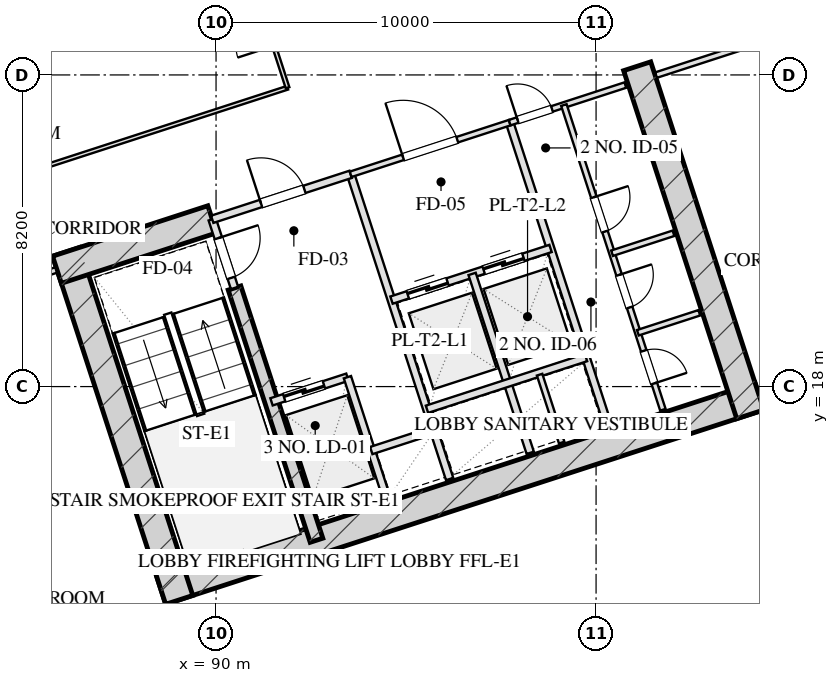
"""IFC4 building model, lengths in metres.
Left out: names, types, materials, properties, quantities, classifications, styles, units other than length and angle.
Written with IfcOpenShell. Run it as: python <this file> out.ifc"""

import sys

from ifc_helpers import new_model, si_unit, direction, frame, frame_2d, origin, place, context, subcontext, project, spatial, rectangle, extrude, element, fill, save


model = new_model("IFC4")
c1 = context("Model", 3, precision=1e-05, world=origin(), true_north=direction((0.0, 1.0)))
c2 = subcontext(c1, "Body", "Model", "MODEL_VIEW")
j1 = project(units=[si_unit("LENGTHUNIT", "METRE"), si_unit("PLANEANGLEUNIT", "RADIAN")], contexts=[c1])
p1 = place(None, origin())
s1 = spatial("IfcSite", under=j1, at=p1, CompositionType="ELEMENT")
p2 = place(p1, origin())
s2 = spatial("IfcBuilding", under=s1, at=p2, CompositionType="ELEMENT")
p3 = place(p2, frame((0.0, 0.0, 50.6)))
s3 = spatial("IfcBuildingStorey", under=s2, at=p3, CompositionType="ELEMENT", Elevation=50.6)
p4 = place(p3, frame((88.559, 12.629, 0.0), z_axis=(0.0, 0.0, 1.0), x_axis=(0.951056072937, 0.309018358888, 0.0)))
e1 = element("IfcWall", 1, at=p4, inside=s3, PredefinedType="SHEAR", context=c2, shape_type="SweptSolid", body=[
    extrude(rectangle(XDim=16.55, YDim=0.75, at=frame_2d((8.275, 0.0))), origin(), (0.0, 0.0, 1.0), 3.45),
])
p5 = place(p3, frame((86.055, 21.546, 0.0), z_axis=(0.0, 0.0, 1.0), x_axis=(0.309023585745, -0.951054374604, 0.0)))
e2 = element("IfcWall", 2, at=p5, inside=s3, PredefinedType="SHEAR", context=c2, shape_type="SweptSolid", body=[
    extrude(rectangle(XDim=9.63, YDim=0.75, at=frame_2d((4.815, 0.0))), origin(), (0.0, 0.0, 1.0), 3.45),
])
p6 = place(p3, frame((101.082, 26.429, 0.0), z_axis=(0.0, 0.0, 1.0), x_axis=(0.309016134813, -0.951056795583, 0.0)))
e3 = element("IfcWall", 3, at=p6, inside=s3, PredefinedType="SHEAR", context=c2, shape_type="SweptSolid", body=[
    extrude(rectangle(XDim=9.63, YDim=0.75, at=frame_2d((4.815, 0.0))), origin(), (0.0, 0.0, 1.0), 3.45),
])
p7 = place(p3, frame((90.486, 20.594, 0.0), z_axis=(0.0, 0.0, 1.0), x_axis=(0.309020428229, -0.951055400562, 0.0)))
e4 = element("IfcWall", 4, at=p7, inside=s3, PredefinedType="SHEAR", context=c2, shape_type="SweptSolid", body=[
    extrude(rectangle(XDim=6.98, YDim=0.35, at=frame_2d((3.49, 0.0))), origin(), (0.0, 0.0, 1.0), 3.45),
])
p8 = place(p3, frame((85.814, 21.074, 0.0), z_axis=(0.0, 0.0, 1.0), x_axis=(0.95106580992, 0.308988390074, 0.0)))
e5 = element("IfcWall", 5, at=p8, inside=s3, PredefinedType="SHEAR", context=c2, shape_type="SweptSolid", body=[
    extrude(rectangle(XDim=4.295, YDim=0.75, at=frame_2d((2.147, 0.0))), origin(), (0.0, 0.0, 1.0), 3.45),
])
p9 = place(p3, frame((100.345, 63.648, 0.0), z_axis=(0.0, 0.0, 1.0), x_axis=(0.309014526607, -0.951057318118, 0.0)))
e6 = element("IfcWall", 6, at=p9, inside=s3, PredefinedType="SOLIDWALL", context=c2, shape_type="SweptSolid", body=[
    extrude(rectangle(XDim=50.0, YDim=0.4, at=frame_2d((25.0, 0.0))), origin(), (0.0, 0.0, 1.0), 2.61),
])
p10 = place(p9, frame((30.15, 0.0, 0.75)))
e7 = element("IfcOpeningElement", 7, at=p10, cuts=e6, PredefinedType="OPENING", context=c2, shape_type="SweptSolid", body=[
    extrude(rectangle(XDim=2.5, YDim=1.46, at=frame_2d((1.25, 0.73))), frame((0.0, 0.21, 0.0), z_axis=(0.0, -1.0, 0.0), x_axis=(1.0, 0.0, 0.0)), (0.0, 0.0, 1.0), 0.42),
])
p11 = place(p9, frame((18.65, 0.0, 0.0)))
e8 = element("IfcOpeningElement", 8, at=p11, cuts=e6, PredefinedType="OPENING", context=c2, shape_type="SweptSolid", body=[
    extrude(rectangle(XDim=1.1, YDim=2.15, at=frame_2d((0.55, 1.075))), frame((0.0, 0.21, 0.0), z_axis=(0.0, -1.0, 0.0), x_axis=(1.0, 0.0, 0.0)), (0.0, 0.0, 1.0), 0.42),
])
p12 = place(p3, frame((113.998, 12.567, 0.0), z_axis=(0.0, 0.0, 1.0), x_axis=(-0.951055939317, -0.309018770125, 0.0)))
e9 = element("IfcWall", 9, at=p12, inside=s3, PredefinedType="SOLIDWALL", context=c2, shape_type="SweptSolid", body=[
    extrude(rectangle(XDim=32.4, YDim=0.4, at=frame_2d((16.2, 0.0))), origin(), (0.0, 0.0, 1.0), 2.61),
])
p13 = place(p3, frame((89.899, 22.401, 0.0), z_axis=(0.0, 0.0, 1.0), x_axis=(0.308932062672, -0.951084108086, 0.0)))
e10 = element("IfcWall", 10, at=p13, inside=s3, PredefinedType="PARTITIONING", context=c2, shape_type="SweptSolid", body=[
    extrude(rectangle(XDim=1.9, YDim=0.2, at=frame_2d((0.95, 0.0))), origin(), (0.0, 0.0, 1.0), 3.175),
])
p14 = place(p13, frame((0.52, 0.0, 0.0)))
e11 = element("IfcOpeningElement", 11, at=p14, cuts=e10, PredefinedType="OPENING", context=c2, shape_type="SweptSolid", body=[
    extrude(rectangle(XDim=1.1, YDim=2.05, at=frame_2d((0.55, 1.025))), frame((0.0, 0.11, 0.0), z_axis=(0.0, -1.0, 0.0), x_axis=(1.0, 0.0, 0.0)), (0.0, 0.0, 1.0), 0.22),
])
p15 = place(p3, frame((93.542, 23.585, 0.0), z_axis=(0.0, 0.0, 1.0), x_axis=(0.309042196757, -0.951048327176, 0.0)))
e12 = element("IfcWall", 12, at=p15, inside=s3, PredefinedType="PARTITIONING", context=c2, shape_type="SweptSolid", body=[
    extrude(rectangle(XDim=8.43, YDim=0.2, at=frame_2d((4.215, 0.0))), origin(), (0.0, 0.0, 1.0), 3.175),
])
p16 = place(p3, frame((89.899, 22.401, 0.0), z_axis=(0.0, 0.0, 1.0), x_axis=(0.951046716504, 0.309047153403, 0.0)))
e13 = element("IfcWall", 13, at=p16, inside=s3, PredefinedType="PARTITIONING", context=c2, shape_type="SweptSolid", body=[
    extrude(rectangle(XDim=3.83, YDim=0.2, at=frame_2d((1.915, 0.0))), origin(), (0.0, 0.0, 1.0), 3.175),
])
p17 = place(p16, frame((1.35, 0.0, 0.0)))
e14 = element("IfcOpeningElement", 14, at=p17, cuts=e13, PredefinedType="OPENING", context=c2, shape_type="SweptSolid", body=[
    extrude(rectangle(XDim=1.2, YDim=2.05, at=frame_2d((0.6, 1.025))), frame((0.0, 0.11, 0.0), z_axis=(0.0, -1.0, 0.0), x_axis=(1.0, 0.0, 0.0)), (0.0, 0.0, 1.0), 0.22),
])
p18 = place(p3, frame((91.46, 17.598, 0.0), z_axis=(0.0, 0.0, 1.0), x_axis=(0.951062257173, 0.308999325213, 0.0)))
e15 = element("IfcWall", 15, at=p18, inside=s3, PredefinedType="PARTITIONING", context=c2, shape_type="SweptSolid", body=[
    extrude(rectangle(XDim=2.1, YDim=0.2, at=frame_2d((1.05, 0.0))), origin(), (0.0, 0.0, 1.0), 3.175),
])
p19 = place(p18, frame((0.35, 0.0, 0.0)))
e16 = element("IfcOpeningElement", 16, at=p19, cuts=e15, PredefinedType="OPENING", context=c2, shape_type="SweptSolid", body=[
    extrude(rectangle(XDim=1.1, YDim=2.05, at=frame_2d((0.55, 1.025))), frame((0.0, 0.11, 0.0), z_axis=(0.0, -1.0, 0.0), x_axis=(1.0, 0.0, 0.0)), (0.0, 0.0, 1.0), 0.22),
])
p20 = place(p3, frame((93.457, 18.247, 0.0), z_axis=(0.0, 0.0, 1.0), x_axis=(0.3089935693, -0.951064127245, 0.0)))
e17 = element("IfcWall", 17, at=p20, inside=s3, PredefinedType="PARTITIONING", context=c2, shape_type="SweptSolid", body=[
    extrude(rectangle(XDim=3.7, YDim=0.2, at=frame_2d((1.85, 0.0))), origin(), (0.0, 0.0, 1.0), 3.175),
])
p21 = place(p3, frame((94.084, 16.317, 0.0), z_axis=(0.0, 0.0, 1.0), x_axis=(0.951041328149, 0.309063734775, 0.0)))
e18 = element("IfcWall", 18, at=p21, inside=s3, PredefinedType="PARTITIONING", context=c2, shape_type="SweptSolid", body=[
    extrude(rectangle(XDim=1.73, YDim=0.2, at=frame_2d((0.865, 0.0))), origin(), (0.0, 0.0, 1.0), 3.175),
])
p22 = place(p3, frame((97.727, 24.944, 0.0), z_axis=(0.0, 0.0, 1.0), x_axis=(0.309016001439, -0.951056838919, 0.0)))
e19 = element("IfcWall", 19, at=p22, inside=s3, PredefinedType="PARTITIONING", context=c2, shape_type="SweptSolid", body=[
    extrude(rectangle(XDim=8.43, YDim=0.2, at=frame_2d((4.215, 0.0))), origin(), (0.0, 0.0, 1.0), 3.175),
])
p23 = place(p3, frame((93.542, 23.585, 0.0), z_axis=(0.0, 0.0, 1.0), x_axis=(0.951063829732, 0.308994485023, 0.0)))
e20 = element("IfcWall", 20, at=p23, inside=s3, PredefinedType="PARTITIONING", context=c2, shape_type="SweptSolid", body=[
    extrude(rectangle(XDim=4.4, YDim=0.15, at=frame_2d((2.2, 0.0))), origin(), (0.0, 0.0, 1.0), 3.175),
])
p24 = place(p23, frame((1.45, 0.0, 0.0)))
e21 = element("IfcOpeningElement", 21, at=p24, cuts=e20, PredefinedType="OPENING", context=c2, shape_type="SweptSolid", body=[
    extrude(rectangle(XDim=1.5, YDim=2.05, at=frame_2d((0.75, 1.025))), frame((0.0, 0.085, 0.0), z_axis=(0.0, -1.0, 0.0), x_axis=(1.0, 0.0, 0.0)), (0.0, 0.0, 1.0), 0.17),
])
p25 = place(p3, frame((94.617, 20.275, 0.0), z_axis=(0.0, 0.0, 1.0), x_axis=(0.951058531764, 0.30901079133, 0.0)))
e22 = element("IfcWall", 22, at=p25, inside=s3, PredefinedType="PARTITIONING", context=c2, shape_type="SweptSolid", body=[
    extrude(rectangle(XDim=4.4, YDim=0.2, at=frame_2d((2.2, 0.0))), origin(), (0.0, 0.0, 1.0), 3.175),
])
p26 = place(p25, frame((0.45, 0.0, 0.0)))
e23 = element("IfcOpeningElement", 23, at=p26, cuts=e22, PredefinedType="OPENING", context=c2, shape_type="SweptSolid", body=[
    extrude(rectangle(XDim=1.1, YDim=2.05, at=frame_2d((0.55, 1.025))), frame((0.0, 0.11, 0.0), z_axis=(0.0, -1.0, 0.0), x_axis=(1.0, 0.0, 0.0)), (0.0, 0.0, 1.0), 0.22),
])
p27 = place(p25, frame((2.55, 0.0, 0.0)))
e24 = element("IfcOpeningElement", 24, at=p27, cuts=e22, PredefinedType="OPENING", context=c2, shape_type="SweptSolid", body=[
    extrude(rectangle(XDim=1.1, YDim=2.05, at=frame_2d((0.55, 1.025))), frame((0.0, 0.11, 0.0), z_axis=(0.0, -1.0, 0.0), x_axis=(1.0, 0.0, 0.0)), (0.0, 0.0, 1.0), 0.22),
])
p28 = place(p3, frame((96.738, 20.964, 0.0), z_axis=(0.0, 0.0, 1.0), x_axis=(0.309042578481, -0.951048203135, 0.0)))
e25 = element("IfcWall", 25, at=p28, inside=s3, PredefinedType="PARTITIONING", context=c2, shape_type="SweptSolid", body=[
    extrude(rectangle(XDim=4.95, YDim=0.2, at=frame_2d((2.475, 0.0))), origin(), (0.0, 0.0, 1.0), 3.175),
])
p29 = place(p3, frame((95.551, 17.403, 0.0), z_axis=(0.0, 0.0, 1.0), x_axis=(0.951058531764, 0.30901079133, 0.0)))
e26 = element("IfcWall", 26, at=p29, inside=s3, PredefinedType="PARTITIONING", context=c2, shape_type="SweptSolid", body=[
    extrude(rectangle(XDim=4.4, YDim=0.2, at=frame_2d((2.2, 0.0))), origin(), (0.0, 0.0, 1.0), 3.175),
])
p30 = place(p3, frame((98.514, 18.313, 0.0), z_axis=(0.0, 0.0, 1.0), x_axis=(0.309089008895, -0.951033114345, 0.0)))
e27 = element("IfcWall", 27, at=p30, inside=s3, PredefinedType="PARTITIONING", context=c2, shape_type="SweptSolid", body=[
    extrude(rectangle(XDim=1.88, YDim=0.15, at=frame_2d((0.94, 0.0))), origin(), (0.0, 0.0, 1.0), 3.175),
])
p31 = place(p3, frame((97.727, 24.944, 0.0), z_axis=(0.0, 0.0, 1.0), x_axis=(0.951036872128, 0.309077446369, 0.0)))
e28 = element("IfcWall", 28, at=p31, inside=s3, PredefinedType="PARTITIONING", context=c2, shape_type="SweptSolid", body=[
    extrude(rectangle(XDim=3.2, YDim=0.15, at=frame_2d((1.6, 0.0))), origin(), (0.0, 0.0, 1.0), 3.175),
])
p32 = place(p31, frame((0.22, 0.0, 0.0)))
e29 = element("IfcOpeningElement", 29, at=p32, cuts=e28, PredefinedType="OPENING", context=c2, shape_type="SweptSolid", body=[
    extrude(rectangle(XDim=0.95, YDim=2.05, at=frame_2d((0.475, 1.025))), frame((0.0, 0.085, 0.0), z_axis=(0.0, -1.0, 0.0), x_axis=(1.0, 0.0, 0.0)), (0.0, 0.0, 1.0), 0.17),
])
p33 = place(p3, frame((99.153, 25.408, 0.0), z_axis=(0.0, 0.0, 1.0), x_axis=(0.309016001439, -0.951056838919, 0.0)))
e30 = element("IfcWall", 30, at=p33, inside=s3, PredefinedType="PARTITIONING", context=c2, shape_type="SweptSolid", body=[
    extrude(rectangle(XDim=8.43, YDim=0.15, at=frame_2d((4.215, 0.0))), origin(), (0.0, 0.0, 1.0), 3.175),
])
p34 = place(p33, frame((2.55, 0.0, 0.0)))
e31 = element("IfcOpeningElement", 31, at=p34, cuts=e30, PredefinedType="OPENING", context=c2, shape_type="SweptSolid", body=[
    extrude(rectangle(XDim=0.95, YDim=2.05, at=frame_2d((0.475, 1.025))), frame((0.0, 0.085, 0.0), z_axis=(0.0, -1.0, 0.0), x_axis=(1.0, 0.0, 0.0)), (0.0, 0.0, 1.0), 0.17),
])
p35 = place(p33, frame((4.7, 0.0, 0.0)))
e32 = element("IfcOpeningElement", 32, at=p35, cuts=e30, PredefinedType="OPENING", context=c2, shape_type="SweptSolid", body=[
    extrude(rectangle(XDim=0.9, YDim=2.05, at=frame_2d((0.45, 1.025))), frame((0.0, 0.085, 0.0), z_axis=(0.0, -1.0, 0.0), x_axis=(1.0, 0.0, 0.0)), (0.0, 0.0, 1.0), 0.17),
])
p36 = place(p33, frame((6.8, 0.0, 0.0)))
e33 = element("IfcOpeningElement", 33, at=p36, cuts=e30, PredefinedType="OPENING", context=c2, shape_type="SweptSolid", body=[
    extrude(rectangle(XDim=0.9, YDim=2.05, at=frame_2d((0.45, 1.025))), frame((0.0, 0.085, 0.0), z_axis=(0.0, -1.0, 0.0), x_axis=(1.0, 0.0, 0.0)), (0.0, 0.0, 1.0), 0.17),
])
p37 = place(p3, frame((100.42, 21.509, 0.0), z_axis=(0.0, 0.0, 1.0), x_axis=(0.951040401051, 0.309066587596, 0.0)))
e34 = element("IfcWall", 34, at=p37, inside=s3, PredefinedType="PARTITIONING", context=c2, shape_type="SweptSolid", body=[
    extrude(rectangle(XDim=1.7, YDim=0.15, at=frame_2d((0.85, 0.0))), origin(), (0.0, 0.0, 1.0), 3.175),
])
p38 = place(p3, frame((101.1, 19.416, 0.0), z_axis=(0.0, 0.0, 1.0), x_axis=(0.951054116971, 0.309024378638, 0.0)))
e35 = element("IfcWall", 35, at=p38, inside=s3, PredefinedType="PARTITIONING", context=c2, shape_type="SweptSolid", body=[
    extrude(rectangle(XDim=1.7, YDim=0.15, at=frame_2d((0.85, 0.0))), origin(), (0.0, 0.0, 1.0), 3.175),
])
p39 = place(p3, frame((75.519, 17.729, 0.0), z_axis=(0.0, 0.0, 1.0), x_axis=(0.951056658866, 0.309016555588, 0.0)))
e36 = element("IfcWall", 36, at=p39, inside=s3, PredefinedType="PARTITIONING", context=c2, shape_type="SweptSolid", body=[
    extrude(rectangle(XDim=10.8, YDim=0.15, at=frame_2d((5.4, 0.0))), origin(), (0.0, 0.0, 1.0), 3.175),
])
p40 = place(p39, frame((4.536, 0.0, 0.0)))
e37 = element("IfcOpeningElement", 37, at=p40, cuts=e36, PredefinedType="OPENING", context=c2, shape_type="SweptSolid", body=[
    extrude(rectangle(XDim=1.0, YDim=2.05, at=frame_2d((0.5, 1.025))), frame((0.0, 0.085, 0.0), z_axis=(0.0, -1.0, 0.0), x_axis=(1.0, 0.0, 0.0)), (0.0, 0.0, 1.0), 0.17),
])
p41 = place(p3, frame((101.578, 26.196, 0.0), z_axis=(0.0, 0.0, 1.0), x_axis=(0.951059043131, 0.309009217467, 0.0)))
e38 = element("IfcWall", 38, at=p41, inside=s3, PredefinedType="PARTITIONING", context=c2, shape_type="SweptSolid", body=[
    extrude(rectangle(XDim=10.2, YDim=0.15, at=frame_2d((5.1, 0.0))), origin(), (0.0, 0.0, 1.0), 3.175),
])
p42 = place(p41, frame((4.284, 0.0, 0.0)))
e39 = element("IfcOpeningElement", 39, at=p42, cuts=e38, PredefinedType="OPENING", context=c2, shape_type="SweptSolid", body=[
    extrude(rectangle(XDim=1.0, YDim=2.05, at=frame_2d((0.5, 1.025))), frame((0.0, 0.085, 0.0), z_axis=(0.0, -1.0, 0.0), x_axis=(1.0, 0.0, 0.0)), (0.0, 0.0, 1.0), 0.17),
])
p43 = place(p3, frame((74.691, 20.278, 0.0), z_axis=(0.0, 0.0, 1.0), x_axis=(0.951053521786, 0.309026210375, 0.0)))
e40 = element("IfcWall", 40, at=p43, inside=s3, PredefinedType="MOVABLE", context=c2, shape_type="SweptSolid", body=[
    extrude(rectangle(XDim=18.075, YDim=0.1, at=frame_2d((9.038, 0.0))), origin(), (0.0, 0.0, 1.0), 3.175),
])
p44 = place(p3, frame((91.882, 25.863, 0.0), z_axis=(0.0, 0.0, 1.0), x_axis=(-0.309022042254, 0.951054876125, 0.0)))
e41 = element("IfcWall", 41, at=p44, inside=s3, PredefinedType="MOVABLE", context=c2, shape_type="SweptSolid", body=[
    extrude(rectangle(XDim=16.64, YDim=0.1, at=frame_2d((8.32, 0.0))), origin(), (0.0, 0.0, 1.0), 3.175),
])
p45 = place(p44, frame((1.16, 0.0, 0.0)))
e42 = element("IfcOpeningElement", 42, at=p45, cuts=e41, PredefinedType="OPENING", context=c2, shape_type="SweptSolid", body=[
    extrude(rectangle(XDim=1.0, YDim=2.05, at=frame_2d((0.5, 1.025))), frame((0.0, 0.06, 0.0), z_axis=(0.0, -1.0, 0.0), x_axis=(1.0, 0.0, 0.0)), (0.0, 0.0, 1.0), 0.12),
])
p46 = place(p44, frame((6.16, 0.0, 0.0)))
e43 = element("IfcOpeningElement", 43, at=p46, cuts=e41, PredefinedType="OPENING", context=c2, shape_type="SweptSolid", body=[
    extrude(rectangle(XDim=1.0, YDim=2.05, at=frame_2d((0.5, 1.025))), frame((0.0, 0.06, 0.0), z_axis=(0.0, -1.0, 0.0), x_axis=(1.0, 0.0, 0.0)), (0.0, 0.0, 1.0), 0.12),
])
p47 = place(p44, frame((10.16, 0.0, 0.0)))
e44 = element("IfcOpeningElement", 44, at=p47, cuts=e41, PredefinedType="OPENING", context=c2, shape_type="SweptSolid", body=[
    extrude(rectangle(XDim=1.0, YDim=2.05, at=frame_2d((0.5, 1.025))), frame((0.0, 0.06, 0.0), z_axis=(0.0, -1.0, 0.0), x_axis=(1.0, 0.0, 0.0)), (0.0, 0.0, 1.0), 0.12),
])
p48 = place(p44, frame((14.48, 0.0, 0.0)))
e45 = element("IfcOpeningElement", 45, at=p48, cuts=e41, PredefinedType="OPENING", context=c2, shape_type="SweptSolid", body=[
    extrude(rectangle(XDim=1.0, YDim=2.05, at=frame_2d((0.5, 1.025))), frame((0.0, 0.06, 0.0), z_axis=(0.0, -1.0, 0.0), x_axis=(1.0, 0.0, 0.0)), (0.0, 0.0, 1.0), 0.12),
])
p49 = place(p3, frame((73.356, 24.386, 0.0), z_axis=(0.0, 0.0, 1.0), x_axis=(0.951057491432, 0.309013993197, 0.0)))
e46 = element("IfcWall", 46, at=p49, inside=s3, PredefinedType="MOVABLE", context=c2, shape_type="SweptSolid", body=[
    extrude(rectangle(XDim=18.075, YDim=0.1, at=frame_2d((9.038, 0.0))), origin(), (0.0, 0.0, 1.0), 3.175),
])
p50 = place(p14, origin())
e47 = element("IfcDoor", 47, at=p50, inside=s3, OperationType="SINGLE_SWING_LEFT", PredefinedType="DOOR", context=c2, shape_type="SweptSolid", body=[
    extrude(rectangle(XDim=1.1, YDim=2.05, at=frame_2d((0.55, 1.025))), frame((0.0, 0.025, 0.0), z_axis=(0.0, -1.0, 0.0), x_axis=(1.0, 0.0, 0.0)), (0.0, 0.0, 1.0), 0.05),
])
fill(e11, e47)
p51 = place(p17, origin())
e48 = element("IfcDoor", 48, at=p51, inside=s3, OperationType="SINGLE_SWING_LEFT", PredefinedType="DOOR", context=c2, shape_type="SweptSolid", body=[
    extrude(rectangle(XDim=1.2, YDim=2.05, at=frame_2d((0.6, 1.025))), frame((0.0, 0.025, 0.0), z_axis=(0.0, -1.0, 0.0), x_axis=(1.0, 0.0, 0.0)), (0.0, 0.0, 1.0), 0.05),
])
fill(e14, e48)
p52 = place(p19, origin())
e49 = element("IfcDoor", 49, at=p52, inside=s3, OperationType="DOUBLE_DOOR_SLIDING", PredefinedType="DOOR", context=c2, shape_type="SweptSolid", body=[
    extrude(rectangle(XDim=1.1, YDim=2.05, at=frame_2d((0.55, 1.025))), frame((0.0, 0.025, 0.0), z_axis=(0.0, -1.0, 0.0), x_axis=(1.0, 0.0, 0.0)), (0.0, 0.0, 1.0), 0.05),
])
fill(e16, e49)
p53 = place(p24, origin())
e50 = element("IfcDoor", 50, at=p53, inside=s3, OperationType="SINGLE_SWING_LEFT", PredefinedType="DOOR", context=c2, shape_type="SweptSolid", body=[
    extrude(rectangle(XDim=1.5, YDim=2.05, at=frame_2d((0.75, 1.025))), frame((0.0, 0.025, 0.0), z_axis=(0.0, -1.0, 0.0), x_axis=(1.0, 0.0, 0.0)), (0.0, 0.0, 1.0), 0.05),
])
fill(e21, e50)
p54 = place(p26, origin())
e51 = element("IfcDoor", 51, at=p54, inside=s3, OperationType="DOUBLE_DOOR_SLIDING", PredefinedType="DOOR", context=c2, shape_type="SweptSolid", body=[
    extrude(rectangle(XDim=1.1, YDim=2.05, at=frame_2d((0.55, 1.025))), frame((0.0, 0.025, 0.0), z_axis=(0.0, -1.0, 0.0), x_axis=(1.0, 0.0, 0.0)), (0.0, 0.0, 1.0), 0.05),
])
fill(e23, e51)
p55 = place(p27, origin())
e52 = element("IfcDoor", 52, at=p55, inside=s3, OperationType="DOUBLE_DOOR_SLIDING", PredefinedType="DOOR", context=c2, shape_type="SweptSolid", body=[
    extrude(rectangle(XDim=1.1, YDim=2.05, at=frame_2d((0.55, 1.025))), frame((0.0, 0.025, 0.0), z_axis=(0.0, -1.0, 0.0), x_axis=(1.0, 0.0, 0.0)), (0.0, 0.0, 1.0), 0.05),
])
fill(e24, e52)
p56 = place(p32, origin())
e53 = element("IfcDoor", 53, at=p56, inside=s3, OperationType="SINGLE_SWING_LEFT", PredefinedType="DOOR", context=c2, shape_type="SweptSolid", body=[
    extrude(rectangle(XDim=0.95, YDim=2.05, at=frame_2d((0.475, 1.025))), frame((0.0, 0.025, 0.0), z_axis=(0.0, -1.0, 0.0), x_axis=(1.0, 0.0, 0.0)), (0.0, 0.0, 1.0), 0.05),
])
fill(e29, e53)
p57 = place(p34, origin())
e54 = element("IfcDoor", 54, at=p57, inside=s3, OperationType="SINGLE_SWING_LEFT", PredefinedType="DOOR", context=c2, shape_type="SweptSolid", body=[
    extrude(rectangle(XDim=0.95, YDim=2.05, at=frame_2d((0.475, 1.025))), frame((0.0, 0.025, 0.0), z_axis=(0.0, -1.0, 0.0), x_axis=(1.0, 0.0, 0.0)), (0.0, 0.0, 1.0), 0.05),
])
fill(e31, e54)
p58 = place(p35, origin())
e55 = element("IfcDoor", 55, at=p58, inside=s3, OperationType="SINGLE_SWING_LEFT", PredefinedType="DOOR", context=c2, shape_type="SweptSolid", body=[
    extrude(rectangle(XDim=0.9, YDim=2.05, at=frame_2d((0.45, 1.025))), frame((0.0, 0.025, 0.0), z_axis=(0.0, -1.0, 0.0), x_axis=(1.0, 0.0, 0.0)), (0.0, 0.0, 1.0), 0.05),
])
fill(e32, e55)
p59 = place(p36, origin())
e56 = element("IfcDoor", 56, at=p59, inside=s3, OperationType="SINGLE_SWING_RIGHT", PredefinedType="DOOR", context=c2, shape_type="SweptSolid", body=[
    extrude(rectangle(XDim=0.9, YDim=2.05, at=frame_2d((0.45, 1.025))), frame((0.0, 0.025, 0.0), z_axis=(0.0, -1.0, 0.0), x_axis=(1.0, 0.0, 0.0)), (0.0, 0.0, 1.0), 0.05),
])
fill(e33, e56)
save(model, sys.argv[1])
